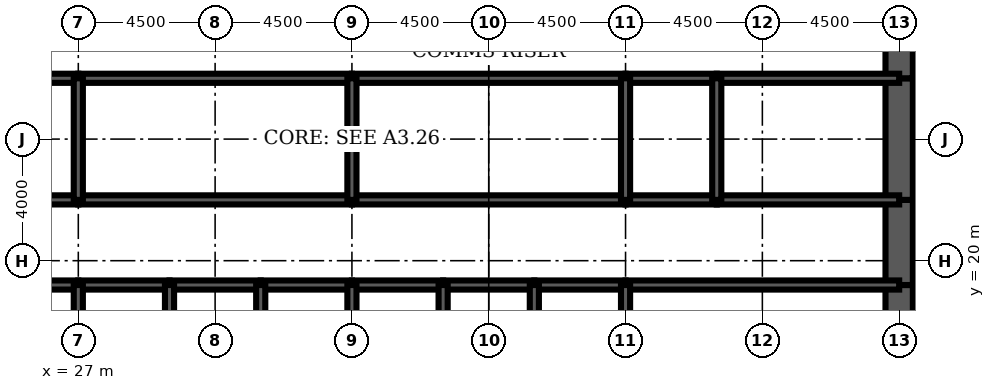
"""IFC4 building model, lengths in metres.
Left out: names, types, materials, properties, quantities, classifications, styles, units other than length and angle.
Written with IfcOpenShell. Run it as: python <this file> out.ifc"""

import sys

from ifc_helpers import new_model, si_unit, direction, frame, frame_2d, origin, place, context, subcontext, project, spatial, rectangle, extrude, element, fill, save


model = new_model("IFC4")
c1 = context("Model", 3, precision=1e-05, world=origin(), true_north=direction((0.0, 1.0)))
c2 = subcontext(c1, "Body", "Model", "MODEL_VIEW")
j1 = project(units=[si_unit("LENGTHUNIT", "METRE"), si_unit("PLANEANGLEUNIT", "RADIAN")], contexts=[c1])
p1 = place(None, origin())
s1 = spatial("IfcSite", under=j1, at=p1, CompositionType="ELEMENT")
p2 = place(p1, origin())
s2 = spatial("IfcBuilding", under=s1, at=p2, CompositionType="ELEMENT")
p3 = place(p2, frame((0.0, 0.0, 113.1)))
s3 = spatial("IfcBuildingStorey", under=s2, at=p3, CompositionType="ELEMENT", Elevation=113.1)
p4 = place(p3, frame((54.0, 16.0, 0.0), z_axis=(0.0, 0.0, 1.0), x_axis=(0.0, 1.0, 0.0)))
e1 = element("IfcWall", 1, at=p4, inside=s3, PredefinedType="SHEAR", context=c2, shape_type="SweptSolid", body=[
    extrude(rectangle(XDim=3.2, YDim=0.9, at=frame_2d((1.6, 0.0))), origin(), (0.0, 0.0, 1.0), 4.2),
])
p5 = place(p3, frame((54.0, 19.2, 0.0), z_axis=(0.0, 0.0, 1.0), x_axis=(0.0, 1.0, 0.0)))
e2 = element("IfcWall", 2, at=p5, inside=s3, PredefinedType="SHEAR", context=c2, shape_type="SweptSolid", body=[
    extrude(rectangle(XDim=2.8, YDim=0.9, at=frame_2d((1.4, 0.0))), origin(), (0.0, 0.0, 1.0), 4.2),
])
p6 = place(p5, frame((0.4, 0.0, 0.0)))
e3 = element("IfcOpeningElement", 3, at=p6, cuts=e2, PredefinedType="OPENING", context=c2, shape_type="SweptSolid", body=[
    extrude(rectangle(XDim=1.8, YDim=2.1, at=frame_2d((0.9, 1.05))), frame((0.0, 0.46, 0.0), z_axis=(0.0, -1.0, 0.0), x_axis=(1.0, 0.0, 0.0)), (0.0, 0.0, 1.0), 0.92),
])
p7 = place(p3, frame((54.0, 22.0, 0.0), z_axis=(0.0, 0.0, 1.0), x_axis=(0.0, 1.0, 0.0)))
e4 = element("IfcWall", 4, at=p7, inside=s3, PredefinedType="SHEAR", context=c2, shape_type="SweptSolid", body=[
    extrude(rectangle(XDim=4.0, YDim=0.9, at=frame_2d((2.0, 0.0))), origin(), (0.0, 0.0, 1.0), 4.2),
])
p8 = place(p3, frame((54.0, 26.0, 0.0), z_axis=(0.0, 0.0, 1.0), x_axis=(0.0, 1.0, 0.0)))
e5 = element("IfcWall", 5, at=p8, inside=s3, PredefinedType="SHEAR", context=c2, shape_type="SweptSolid", body=[
    extrude(rectangle(XDim=2.8, YDim=0.9, at=frame_2d((1.4, 0.0))), origin(), (0.0, 0.0, 1.0), 4.2),
])
p9 = place(p8, frame((0.6, 0.0, 0.0)))
e6 = element("IfcOpeningElement", 6, at=p9, cuts=e5, PredefinedType="OPENING", context=c2, shape_type="SweptSolid", body=[
    extrude(rectangle(XDim=1.8, YDim=2.1, at=frame_2d((0.9, 1.05))), frame((0.0, 0.46, 0.0), z_axis=(0.0, -1.0, 0.0), x_axis=(1.0, 0.0, 0.0)), (0.0, 0.0, 1.0), 0.92),
])
p10 = place(p3, frame((18.0, 19.2, 0.0), z_axis=(0.0, 0.0, 1.0), x_axis=(1.0, 0.0, 0.0)))
e7 = element("IfcWall", 7, at=p10, inside=s3, PredefinedType="SOLIDWALL", context=c2, shape_type="SweptSolid", body=[
    extrude(rectangle(XDim=9.0, YDim=0.3, at=frame_2d((4.5, 0.0))), origin(), (0.0, 0.0, 1.0), 4.2),
])
p11 = place(p10, frame((0.65, 0.0, 0.0)))
e8 = element("IfcOpeningElement", 8, at=p11, cuts=e7, PredefinedType="OPENING", context=c2, shape_type="SweptSolid", body=[
    extrude(rectangle(XDim=1.0, YDim=2.1, at=frame_2d((0.5, 1.05))), frame((0.0, 0.16, 0.0), z_axis=(0.0, -1.0, 0.0), x_axis=(1.0, 0.0, 0.0)), (0.0, 0.0, 1.0), 0.32),
])
p12 = place(p3, frame((27.0, 19.2, 0.0), z_axis=(0.0, 0.0, 1.0), x_axis=(1.0, 0.0, 0.0)))
e9 = element("IfcWall", 9, at=p12, inside=s3, PredefinedType="SOLIDWALL", context=c2, shape_type="SweptSolid", body=[
    extrude(rectangle(XDim=3.0, YDim=0.3, at=frame_2d((1.5, 0.0))), origin(), (0.0, 0.0, 1.0), 4.2),
])
p13 = place(p12, frame((0.95, 0.0, 0.0)))
e10 = element("IfcOpeningElement", 10, at=p13, cuts=e9, PredefinedType="OPENING", context=c2, shape_type="SweptSolid", body=[
    extrude(rectangle(XDim=1.1, YDim=2.2, at=frame_2d((0.55, 1.1))), frame((0.0, 0.16, 0.0), z_axis=(0.0, -1.0, 0.0), x_axis=(1.0, 0.0, 0.0)), (0.0, 0.0, 1.0), 0.32),
])
p14 = place(p3, frame((30.0, 19.2, 0.0), z_axis=(0.0, 0.0, 1.0), x_axis=(1.0, 0.0, 0.0)))
e11 = element("IfcWall", 11, at=p14, inside=s3, PredefinedType="SOLIDWALL", context=c2, shape_type="SweptSolid", body=[
    extrude(rectangle(XDim=3.0, YDim=0.3, at=frame_2d((1.5, 0.0))), origin(), (0.0, 0.0, 1.0), 4.2),
])
p15 = place(p14, frame((0.95, 0.0, 0.0)))
e12 = element("IfcOpeningElement", 12, at=p15, cuts=e11, PredefinedType="OPENING", context=c2, shape_type="SweptSolid", body=[
    extrude(rectangle(XDim=1.1, YDim=2.2, at=frame_2d((0.55, 1.1))), frame((0.0, 0.16, 0.0), z_axis=(0.0, -1.0, 0.0), x_axis=(1.0, 0.0, 0.0)), (0.0, 0.0, 1.0), 0.32),
])
p16 = place(p3, frame((33.0, 19.2, 0.0), z_axis=(0.0, 0.0, 1.0), x_axis=(1.0, 0.0, 0.0)))
e13 = element("IfcWall", 13, at=p16, inside=s3, PredefinedType="SOLIDWALL", context=c2, shape_type="SweptSolid", body=[
    extrude(rectangle(XDim=3.0, YDim=0.3, at=frame_2d((1.5, 0.0))), origin(), (0.0, 0.0, 1.0), 4.2),
])
p17 = place(p16, frame((0.95, 0.0, 0.0)))
e14 = element("IfcOpeningElement", 14, at=p17, cuts=e13, PredefinedType="OPENING", context=c2, shape_type="SweptSolid", body=[
    extrude(rectangle(XDim=1.1, YDim=2.2, at=frame_2d((0.55, 1.1))), frame((0.0, 0.16, 0.0), z_axis=(0.0, -1.0, 0.0), x_axis=(1.0, 0.0, 0.0)), (0.0, 0.0, 1.0), 0.32),
])
p18 = place(p3, frame((36.0, 19.2, 0.0), z_axis=(0.0, 0.0, 1.0), x_axis=(1.0, 0.0, 0.0)))
e15 = element("IfcWall", 15, at=p18, inside=s3, PredefinedType="SOLIDWALL", context=c2, shape_type="SweptSolid", body=[
    extrude(rectangle(XDim=3.0, YDim=0.3, at=frame_2d((1.5, 0.0))), origin(), (0.0, 0.0, 1.0), 4.2),
])
p19 = place(p18, frame((0.95, 0.0, 0.0)))
e16 = element("IfcOpeningElement", 16, at=p19, cuts=e15, PredefinedType="OPENING", context=c2, shape_type="SweptSolid", body=[
    extrude(rectangle(XDim=1.1, YDim=2.2, at=frame_2d((0.55, 1.1))), frame((0.0, 0.16, 0.0), z_axis=(0.0, -1.0, 0.0), x_axis=(1.0, 0.0, 0.0)), (0.0, 0.0, 1.0), 0.32),
])
p20 = place(p3, frame((39.0, 19.2, 0.0), z_axis=(0.0, 0.0, 1.0), x_axis=(1.0, 0.0, 0.0)))
e17 = element("IfcWall", 17, at=p20, inside=s3, PredefinedType="SOLIDWALL", context=c2, shape_type="SweptSolid", body=[
    extrude(rectangle(XDim=3.0, YDim=0.3, at=frame_2d((1.5, 0.0))), origin(), (0.0, 0.0, 1.0), 4.2),
])
p21 = place(p20, frame((1.0, 0.0, 0.0)))
e18 = element("IfcOpeningElement", 18, at=p21, cuts=e17, PredefinedType="OPENING", context=c2, shape_type="SweptSolid", body=[
    extrude(rectangle(XDim=1.0, YDim=2.1, at=frame_2d((0.5, 1.05))), frame((0.0, 0.16, 0.0), z_axis=(0.0, -1.0, 0.0), x_axis=(1.0, 0.0, 0.0)), (0.0, 0.0, 1.0), 0.32),
])
p22 = place(p3, frame((42.0, 19.2, 0.0), z_axis=(0.0, 0.0, 1.0), x_axis=(1.0, 0.0, 0.0)))
e19 = element("IfcWall", 19, at=p22, inside=s3, PredefinedType="SOLIDWALL", context=c2, shape_type="SweptSolid", body=[
    extrude(rectangle(XDim=3.0, YDim=0.3, at=frame_2d((1.5, 0.0))), origin(), (0.0, 0.0, 1.0), 4.2),
])
p23 = place(p3, frame((45.0, 19.2, 0.0), z_axis=(0.0, 0.0, 1.0), x_axis=(1.0, 0.0, 0.0)))
e20 = element("IfcWall", 20, at=p23, inside=s3, PredefinedType="SOLIDWALL", context=c2, shape_type="SweptSolid", body=[
    extrude(rectangle(XDim=9.0, YDim=0.3, at=frame_2d((4.5, 0.0))), origin(), (0.0, 0.0, 1.0), 4.2),
])
p24 = place(p23, frame((7.35, 0.0, 0.0)))
e21 = element("IfcOpeningElement", 21, at=p24, cuts=e20, PredefinedType="OPENING", context=c2, shape_type="SweptSolid", body=[
    extrude(rectangle(XDim=1.0, YDim=2.1, at=frame_2d((0.5, 1.05))), frame((0.0, 0.16, 0.0), z_axis=(0.0, -1.0, 0.0), x_axis=(1.0, 0.0, 0.0)), (0.0, 0.0, 1.0), 0.32),
])
p25 = place(p3, frame((24.0, 22.0, 0.0), z_axis=(0.0, 0.0, 1.0), x_axis=(1.0, 0.0, 0.0)))
e22 = element("IfcWall", 22, at=p25, inside=s3, PredefinedType="SOLIDWALL", context=c2, shape_type="SweptSolid", body=[
    extrude(rectangle(XDim=3.0, YDim=0.3, at=frame_2d((1.5, 0.0))), origin(), (0.0, 0.0, 1.0), 4.2),
])
p26 = place(p25, frame((1.0, 0.0, 0.0)))
e23 = element("IfcOpeningElement", 23, at=p26, cuts=e22, PredefinedType="OPENING", context=c2, shape_type="SweptSolid", body=[
    extrude(rectangle(XDim=1.0, YDim=2.1, at=frame_2d((0.5, 1.05))), frame((0.0, 0.16, 0.0), z_axis=(0.0, -1.0, 0.0), x_axis=(1.0, 0.0, 0.0)), (0.0, 0.0, 1.0), 0.32),
])
p27 = place(p3, frame((27.0, 22.0, 0.0), z_axis=(0.0, 0.0, 1.0), x_axis=(1.0, 0.0, 0.0)))
e24 = element("IfcWall", 24, at=p27, inside=s3, PredefinedType="SOLIDWALL", context=c2, shape_type="SweptSolid", body=[
    extrude(rectangle(XDim=9.0, YDim=0.3, at=frame_2d((4.5, 0.0))), origin(), (0.0, 0.0, 1.0), 4.2),
])
p28 = place(p27, frame((4.0, 0.0, 0.0)))
e25 = element("IfcOpeningElement", 25, at=p28, cuts=e24, PredefinedType="OPENING", context=c2, shape_type="SweptSolid", body=[
    extrude(rectangle(XDim=1.0, YDim=2.1, at=frame_2d((0.5, 1.05))), frame((0.0, 0.16, 0.0), z_axis=(0.0, -1.0, 0.0), x_axis=(1.0, 0.0, 0.0)), (0.0, 0.0, 1.0), 0.32),
])
p29 = place(p3, frame((36.0, 22.0, 0.0), z_axis=(0.0, 0.0, 1.0), x_axis=(1.0, 0.0, 0.0)))
e26 = element("IfcWall", 26, at=p29, inside=s3, PredefinedType="SOLIDWALL", context=c2, shape_type="SweptSolid", body=[
    extrude(rectangle(XDim=9.0, YDim=0.3, at=frame_2d((4.5, 0.0))), origin(), (0.0, 0.0, 1.0), 4.2),
])
p30 = place(p29, frame((4.0, 0.0, 0.0)))
e27 = element("IfcOpeningElement", 27, at=p30, cuts=e26, PredefinedType="OPENING", context=c2, shape_type="SweptSolid", body=[
    extrude(rectangle(XDim=1.0, YDim=2.1, at=frame_2d((0.5, 1.05))), frame((0.0, 0.16, 0.0), z_axis=(0.0, -1.0, 0.0), x_axis=(1.0, 0.0, 0.0)), (0.0, 0.0, 1.0), 0.32),
])
p31 = place(p3, frame((45.0, 22.0, 0.0), z_axis=(0.0, 0.0, 1.0), x_axis=(1.0, 0.0, 0.0)))
e28 = element("IfcWall", 28, at=p31, inside=s3, PredefinedType="SOLIDWALL", context=c2, shape_type="SweptSolid", body=[
    extrude(rectangle(XDim=3.0, YDim=0.3, at=frame_2d((1.5, 0.0))), origin(), (0.0, 0.0, 1.0), 4.2),
])
p32 = place(p31, frame((1.0, 0.0, 0.0)))
e29 = element("IfcOpeningElement", 29, at=p32, cuts=e28, PredefinedType="OPENING", context=c2, shape_type="SweptSolid", body=[
    extrude(rectangle(XDim=1.0, YDim=2.1, at=frame_2d((0.5, 1.05))), frame((0.0, 0.16, 0.0), z_axis=(0.0, -1.0, 0.0), x_axis=(1.0, 0.0, 0.0)), (0.0, 0.0, 1.0), 0.32),
])
p33 = place(p3, frame((48.0, 22.0, 0.0), z_axis=(0.0, 0.0, 1.0), x_axis=(1.0, 0.0, 0.0)))
e30 = element("IfcWall", 30, at=p33, inside=s3, PredefinedType="SOLIDWALL", context=c2, shape_type="SweptSolid", body=[
    extrude(rectangle(XDim=6.0, YDim=0.3, at=frame_2d((3.0, 0.0))), origin(), (0.0, 0.0, 1.0), 4.2),
])
p34 = place(p33, frame((2.0, 0.0, 0.0)))
e31 = element("IfcOpeningElement", 31, at=p34, cuts=e30, PredefinedType="OPENING", context=c2, shape_type="SweptSolid", body=[
    extrude(rectangle(XDim=1.0, YDim=2.1, at=frame_2d((0.5, 1.05))), frame((0.0, 0.16, 0.0), z_axis=(0.0, -1.0, 0.0), x_axis=(1.0, 0.0, 0.0)), (0.0, 0.0, 1.0), 0.32),
])
p35 = place(p33, frame((4.0, 0.0, 0.0)))
e32 = element("IfcOpeningElement", 32, at=p35, cuts=e30, PredefinedType="OPENING", context=c2, shape_type="SweptSolid", body=[
    extrude(rectangle(XDim=1.0, YDim=2.1, at=frame_2d((0.5, 1.05))), frame((0.0, 0.16, 0.0), z_axis=(0.0, -1.0, 0.0), x_axis=(1.0, 0.0, 0.0)), (0.0, 0.0, 1.0), 0.32),
])
p36 = place(p3, frame((24.0, 26.0, 0.0), z_axis=(0.0, 0.0, 1.0), x_axis=(1.0, 0.0, 0.0)))
e33 = element("IfcWall", 33, at=p36, inside=s3, PredefinedType="SOLIDWALL", context=c2, shape_type="SweptSolid", body=[
    extrude(rectangle(XDim=3.0, YDim=0.3, at=frame_2d((1.5, 0.0))), origin(), (0.0, 0.0, 1.0), 4.2),
])
for number, where, z_axis, x_axis in (
    (34, (27.0, 26.0, 0.0), (0.0, 0.0, 1.0), (1.0, 0.0, 0.0)),
    (35, (36.0, 26.0, 0.0), (0.0, 0.0, 1.0), (1.0, 0.0, 0.0)),
):
    element("IfcWall", number, at=place(p3, frame(where, z_axis=z_axis, x_axis=x_axis)), inside=s3, PredefinedType="SOLIDWALL", context=c2, shape_type="SweptSolid", body=[
        extrude(rectangle(XDim=9.0, YDim=0.3, at=frame_2d((4.5, 0.0))), origin(), (0.0, 0.0, 1.0), 4.2),
    ])
p37 = place(p3, frame((45.0, 26.0, 0.0), z_axis=(0.0, 0.0, 1.0), x_axis=(1.0, 0.0, 0.0)))
e36 = element("IfcWall", 36, at=p37, inside=s3, PredefinedType="SOLIDWALL", context=c2, shape_type="SweptSolid", body=[
    extrude(rectangle(XDim=3.0, YDim=0.3, at=frame_2d((1.5, 0.0))), origin(), (0.0, 0.0, 1.0), 4.2),
])
p38 = place(p3, frame((48.0, 26.0, 0.0), z_axis=(0.0, 0.0, 1.0), x_axis=(1.0, 0.0, 0.0)))
e37 = element("IfcWall", 37, at=p38, inside=s3, PredefinedType="SOLIDWALL", context=c2, shape_type="SweptSolid", body=[
    extrude(rectangle(XDim=6.0, YDim=0.3, at=frame_2d((3.0, 0.0))), origin(), (0.0, 0.0, 1.0), 4.2),
])
for number, where, z_axis, x_axis in (
    (38, (27.0, 16.0, 0.0), (0.0, 0.0, 1.0), (0.0, 1.0, 0.0)),
    (39, (30.0, 16.0, 0.0), (0.0, 0.0, 1.0), (0.0, 1.0, 0.0)),
    (40, (33.0, 16.0, 0.0), (0.0, 0.0, 1.0), (0.0, 1.0, 0.0)),
    (41, (36.0, 16.0, 0.0), (0.0, 0.0, 1.0), (0.0, 1.0, 0.0)),
    (42, (39.0, 16.0, 0.0), (0.0, 0.0, 1.0), (0.0, 1.0, 0.0)),
    (43, (42.0, 16.0, 0.0), (0.0, 0.0, 1.0), (0.0, 1.0, 0.0)),
    (44, (45.0, 16.0, 0.0), (0.0, 0.0, 1.0), (0.0, 1.0, 0.0)),
):
    element("IfcWall", number, at=place(p3, frame(where, z_axis=z_axis, x_axis=x_axis)), inside=s3, PredefinedType="SOLIDWALL", context=c2, shape_type="SweptSolid", body=[
        extrude(rectangle(XDim=3.2, YDim=0.3, at=frame_2d((1.6, 0.0))), origin(), (0.0, 0.0, 1.0), 4.2),
    ])
for number, where, z_axis, x_axis in (
    (45, (27.0, 22.0, 0.0), (0.0, 0.0, 1.0), (0.0, 1.0, 0.0)),
    (46, (36.0, 22.0, 0.0), (0.0, 0.0, 1.0), (0.0, 1.0, 0.0)),
    (47, (45.0, 22.0, 0.0), (0.0, 0.0, 1.0), (0.0, 1.0, 0.0)),
    (48, (48.0, 22.0, 0.0), (0.0, 0.0, 1.0), (0.0, 1.0, 0.0)),
):
    element("IfcWall", number, at=place(p3, frame(where, z_axis=z_axis, x_axis=x_axis)), inside=s3, PredefinedType="SOLIDWALL", context=c2, shape_type="SweptSolid", body=[
        extrude(rectangle(XDim=4.0, YDim=0.3, at=frame_2d((2.0, 0.0))), origin(), (0.0, 0.0, 1.0), 4.2),
    ])
p39 = place(p3, frame((39.0, 22.15, 0.0), z_axis=(0.0, 0.0, 1.0), x_axis=(0.0, 1.0, 0.0)))
e49 = element("IfcWall", 49, at=p39, inside=s3, PredefinedType="PARTITIONING", context=c2, shape_type="SweptSolid", body=[
    extrude(rectangle(XDim=3.7, YDim=0.15, at=frame_2d((1.85, 0.0))), origin(), (0.0, 0.0, 1.0), 3.0),
])
p40 = place(p39, frame((2.2, 0.0, 0.0)))
e50 = element("IfcOpeningElement", 50, at=p40, cuts=e49, PredefinedType="OPENING", context=c2, shape_type="SweptSolid", body=[
    extrude(rectangle(XDim=1.0, YDim=2.1, at=frame_2d((0.5, 1.05))), frame((0.0, 0.085, 0.0), z_axis=(0.0, -1.0, 0.0), x_axis=(1.0, 0.0, 0.0)), (0.0, 0.0, 1.0), 0.17),
])
p41 = place(p3, frame((51.375, 22.15, 0.0), z_axis=(0.0, 0.0, 1.0), x_axis=(0.0, 1.0, 0.0)))
e51 = element("IfcWall", 51, at=p41, inside=s3, PredefinedType="PARTITIONING", context=c2, shape_type="SweptSolid", body=[
    extrude(rectangle(XDim=3.7, YDim=0.15, at=frame_2d((1.85, 0.0))), origin(), (0.0, 0.0, 1.0), 3.0),
])
p42 = place(p3, frame((48.6, 19.35, 0.0), z_axis=(0.0, 0.0, 1.0), x_axis=(0.0, 1.0, 0.0)))
e52 = element("IfcWall", 52, at=p42, inside=s3, PredefinedType="PARTITIONING", context=c2, shape_type="SweptSolid", body=[
    extrude(rectangle(XDim=2.5, YDim=0.15, at=frame_2d((1.25, 0.0))), origin(), (0.0, 0.0, 1.0), 3.0),
])
p43 = place(p42, frame((1.15, 0.0, 0.0)))
e53 = element("IfcOpeningElement", 53, at=p43, cuts=e52, PredefinedType="OPENING", context=c2, shape_type="SweptSolid", body=[
    extrude(rectangle(XDim=1.0, YDim=2.1, at=frame_2d((0.5, 1.05))), frame((0.0, 0.085, 0.0), z_axis=(0.0, -1.0, 0.0), x_axis=(1.0, 0.0, 0.0)), (0.0, 0.0, 1.0), 0.17),
])
p44 = place(p40, origin())
e54 = element("IfcDoor", 54, at=p44, inside=s3, OperationType="SINGLE_SWING_RIGHT", PredefinedType="DOOR", context=c2, shape_type="SweptSolid", body=[
    extrude(rectangle(XDim=1.0, YDim=2.1, at=frame_2d((0.5, 1.05))), frame((0.0, 0.025, 0.0), z_axis=(0.0, -1.0, 0.0), x_axis=(1.0, 0.0, 0.0)), (0.0, 0.0, 1.0), 0.05),
])
fill(e50, e54)
p45 = place(p43, origin())
e55 = element("IfcDoor", 55, at=p45, inside=s3, OperationType="SINGLE_SWING_RIGHT", PredefinedType="DOOR", context=c2, shape_type="SweptSolid", body=[
    extrude(rectangle(XDim=1.0, YDim=2.1, at=frame_2d((0.5, 1.05))), frame((0.0, 0.025, 0.0), z_axis=(0.0, -1.0, 0.0), x_axis=(1.0, 0.0, 0.0)), (0.0, 0.0, 1.0), 0.05),
])
fill(e53, e55)
p46 = place(p13, origin())
e56 = element("IfcDoor", 56, at=p46, inside=s3, OperationType="DOUBLE_DOOR_SLIDING", PredefinedType="USERDEFINED", context=c2, shape_type="SweptSolid", body=[
    extrude(rectangle(XDim=1.1, YDim=2.2, at=frame_2d((0.55, 1.1))), frame((0.0, 0.025, 0.0), z_axis=(0.0, -1.0, 0.0), x_axis=(1.0, 0.0, 0.0)), (0.0, 0.0, 1.0), 0.05),
])
fill(e10, e56)
p47 = place(p15, origin())
e57 = element("IfcDoor", 57, at=p47, inside=s3, OperationType="DOUBLE_DOOR_SLIDING", PredefinedType="USERDEFINED", context=c2, shape_type="SweptSolid", body=[
    extrude(rectangle(XDim=1.1, YDim=2.2, at=frame_2d((0.55, 1.1))), frame((0.0, 0.025, 0.0), z_axis=(0.0, -1.0, 0.0), x_axis=(1.0, 0.0, 0.0)), (0.0, 0.0, 1.0), 0.05),
])
fill(e12, e57)
p48 = place(p17, origin())
e58 = element("IfcDoor", 58, at=p48, inside=s3, OperationType="DOUBLE_DOOR_SLIDING", PredefinedType="USERDEFINED", context=c2, shape_type="SweptSolid", body=[
    extrude(rectangle(XDim=1.1, YDim=2.2, at=frame_2d((0.55, 1.1))), frame((0.0, 0.025, 0.0), z_axis=(0.0, -1.0, 0.0), x_axis=(1.0, 0.0, 0.0)), (0.0, 0.0, 1.0), 0.05),
])
fill(e14, e58)
p49 = place(p19, origin())
e59 = element("IfcDoor", 59, at=p49, inside=s3, OperationType="DOUBLE_DOOR_SLIDING", PredefinedType="USERDEFINED", context=c2, shape_type="SweptSolid", body=[
    extrude(rectangle(XDim=1.1, YDim=2.2, at=frame_2d((0.55, 1.1))), frame((0.0, 0.025, 0.0), z_axis=(0.0, -1.0, 0.0), x_axis=(1.0, 0.0, 0.0)), (0.0, 0.0, 1.0), 0.05),
])
fill(e16, e59)
p50 = place(p24, origin())
e60 = element("IfcDoor", 60, at=p50, inside=s3, OperationType="SINGLE_SWING_RIGHT", PredefinedType="DOOR", context=c2, shape_type="SweptSolid", body=[
    extrude(rectangle(XDim=1.0, YDim=2.1, at=frame_2d((0.5, 1.05))), frame((0.0, 0.025, 0.0), z_axis=(0.0, -1.0, 0.0), x_axis=(1.0, 0.0, 0.0)), (0.0, 0.0, 1.0), 0.05),
])
fill(e21, e60)
p51 = place(p6, origin())
e61 = element("IfcDoor", 61, at=p51, inside=s3, OperationType="SINGLE_SWING_LEFT", PredefinedType="DOOR", context=c2, shape_type="SweptSolid", body=[
    extrude(rectangle(XDim=1.8, YDim=2.1, at=frame_2d((0.9, 1.05))), frame((0.0, 0.45, 0.0), z_axis=(0.0, -1.0, 0.0), x_axis=(1.0, 0.0, 0.0)), (0.0, 0.0, 1.0), 0.899),
])
fill(e3, e61)
p52 = place(p9, origin())
e62 = element("IfcDoor", 62, at=p52, inside=s3, OperationType="SINGLE_SWING_LEFT", PredefinedType="DOOR", context=c2, shape_type="SweptSolid", body=[
    extrude(rectangle(XDim=1.8, YDim=2.1, at=frame_2d((0.9, 1.05))), frame((0.0, 0.45, 0.0), z_axis=(0.0, -1.0, 0.0), x_axis=(1.0, 0.0, 0.0)), (0.0, 0.0, 1.0), 0.899),
])
fill(e6, e62)
p53 = place(p28, origin())
e63 = element("IfcDoor", 63, at=p53, inside=s3, OperationType="SINGLE_SWING_LEFT", PredefinedType="DOOR", context=c2, shape_type="SweptSolid", body=[
    extrude(rectangle(XDim=1.0, YDim=2.1, at=frame_2d((0.5, 1.05))), frame((0.0, 0.025, 0.0), z_axis=(0.0, -1.0, 0.0), x_axis=(1.0, 0.0, 0.0)), (0.0, 0.0, 1.0), 0.05),
])
fill(e25, e63)
p54 = place(p30, origin())
e64 = element("IfcDoor", 64, at=p54, inside=s3, OperationType="SINGLE_SWING_LEFT", PredefinedType="DOOR", context=c2, shape_type="SweptSolid", body=[
    extrude(rectangle(XDim=1.0, YDim=2.1, at=frame_2d((0.5, 1.05))), frame((0.0, 0.025, 0.0), z_axis=(0.0, -1.0, 0.0), x_axis=(1.0, 0.0, 0.0)), (0.0, 0.0, 1.0), 0.05),
])
fill(e27, e64)
p55 = place(p32, origin())
e65 = element("IfcDoor", 65, at=p55, inside=s3, OperationType="SINGLE_SWING_LEFT", PredefinedType="DOOR", context=c2, shape_type="SweptSolid", body=[
    extrude(rectangle(XDim=1.0, YDim=2.1, at=frame_2d((0.5, 1.05))), frame((0.0, 0.025, 0.0), z_axis=(0.0, -1.0, 0.0), x_axis=(1.0, 0.0, 0.0)), (0.0, 0.0, 1.0), 0.05),
])
fill(e29, e65)
p56 = place(p34, origin())
e66 = element("IfcDoor", 66, at=p56, inside=s3, OperationType="SINGLE_SWING_LEFT", PredefinedType="DOOR", context=c2, shape_type="SweptSolid", body=[
    extrude(rectangle(XDim=1.0, YDim=2.1, at=frame_2d((0.5, 1.05))), frame((0.0, 0.025, 0.0), z_axis=(0.0, -1.0, 0.0), x_axis=(1.0, 0.0, 0.0)), (0.0, 0.0, 1.0), 0.05),
])
fill(e31, e66)
p57 = place(p35, origin())
e67 = element("IfcDoor", 67, at=p57, inside=s3, OperationType="SINGLE_SWING_RIGHT", PredefinedType="DOOR", context=c2, shape_type="SweptSolid", body=[
    extrude(rectangle(XDim=1.0, YDim=2.1, at=frame_2d((0.5, 1.05))), frame((0.0, 0.025, 0.0), z_axis=(0.0, -1.0, 0.0), x_axis=(1.0, 0.0, 0.0)), (0.0, 0.0, 1.0), 0.05),
])
fill(e32, e67)
p58 = place(p21, origin())
e68 = element("IfcDoor", 68, at=p58, inside=s3, OperationType="SINGLE_SWING_LEFT", PredefinedType="DOOR", context=c2, shape_type="SweptSolid", body=[
    extrude(rectangle(XDim=1.0, YDim=2.1, at=frame_2d((0.5, 1.05))), frame((0.0, 0.025, 0.0), z_axis=(0.0, -1.0, 0.0), x_axis=(1.0, 0.0, 0.0)), (0.0, 0.0, 1.0), 0.05),
])
fill(e18, e68)
save(model, sys.argv[1])
